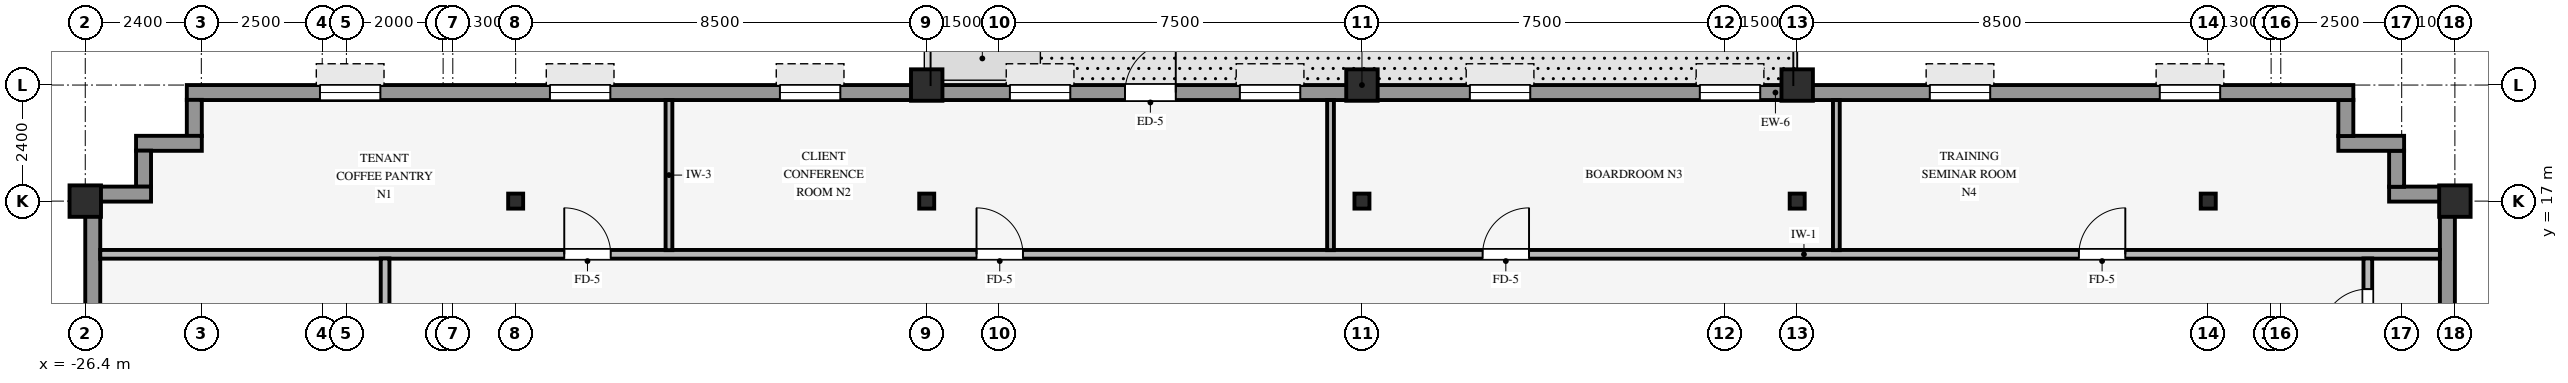
"""IFC4 building model, lengths in metres.
Left out: names, types, materials, properties, quantities, classifications, styles, units other than length and angle.
Written with IfcOpenShell. Run it as: python <this file> out.ifc"""

import sys

from ifc_helpers import new_model, si_unit, direction, frame, frame_2d, origin, origin_2d, place, context, subcontext, project, spatial, rectangle, hollow_rectangle, i_section, extrude, source, transform, mapped, element, fill, save


model = new_model("IFC4")
c1 = context("Model", 3, precision=1e-05, world=origin(), true_north=direction((0.0, 1.0)))
c2 = subcontext(c1, "Body", "Model", "MODEL_VIEW")
j1 = project(units=[si_unit("LENGTHUNIT", "METRE"), si_unit("PLANEANGLEUNIT", "RADIAN")], contexts=[c1])
p1 = place(None, origin())
s1 = spatial("IfcSite", under=j1, at=p1, CompositionType="ELEMENT")
p2 = place(p1, origin())
s2 = spatial("IfcBuilding", under=s1, at=p2, CompositionType="ELEMENT")
p3 = place(p2, frame((0.0, 0.0, 167.65)))
s3 = spatial("IfcBuildingStorey", under=s2, at=p3, CompositionType="ELEMENT", Elevation=167.65)
p4 = place(p3, frame((-26.4, 17.0, 0.0), z_axis=(0.0, 0.0, 1.0), x_axis=(1.0, 0.0, 0.0)))
e1 = element("IfcColumn", 1, at=p4, inside=s3, PredefinedType="COLUMN", context=c2, shape_type="SweptSolid", body=[
    extrude(hollow_rectangle(XDim=0.65, YDim=0.65, WallThickness=0.04, InnerFilletRadius=0.04, OuterFilletRadius=0.08, at=origin_2d()), origin(), (0.0, 0.0, 1.0), 3.37),
])
for number, where, z_axis, x_axis in (
    (2, (22.6, 17.0, -0.4), (0.0, 0.0, 1.0), (1.0, 0.0, 0.0)),
    (3, (-9.0, 19.4, -0.4), (0.0, 0.0, 1.0), (1.0, 0.0, 0.0)),
    (4, (0.0, 19.4, -0.4), (0.0, 0.0, 1.0), (1.0, 0.0, 0.0)),
    (5, (9.0, 19.4, -0.4), (0.0, 0.0, 1.0), (1.0, 0.0, 0.0)),
):
    element("IfcColumn", number, at=place(p3, frame(where, z_axis=z_axis, x_axis=x_axis)), inside=s3, PredefinedType="COLUMN", context=c2, shape_type="SweptSolid", body=[
        extrude(hollow_rectangle(XDim=0.65, YDim=0.65, WallThickness=0.04, InnerFilletRadius=0.04, OuterFilletRadius=0.08, at=origin_2d()), origin(), (0.0, 0.0, 1.0), 3.77),
    ])
for number, where, z_axis, x_axis in (
    (6, (0.0, 17.0, 0.0), (0.0, 0.0, 1.0), (1.0, 0.0, 0.0)),
    (7, (-17.5, 17.0, 0.0), (0.0, 0.0, 1.0), (1.0, 0.0, 0.0)),
    (8, (-9.0, 17.0, 0.0), (0.0, 0.0, 1.0), (1.0, 0.0, 0.0)),
    (9, (9.0, 17.0, 0.0), (0.0, 0.0, 1.0), (1.0, 0.0, 0.0)),
    (10, (17.5, 17.0, 0.0), (0.0, 0.0, 1.0), (1.0, 0.0, 0.0)),
):
    element("IfcColumn", number, at=place(p3, frame(where, z_axis=z_axis, x_axis=x_axis)), inside=s3, PredefinedType="COLUMN", context=c2, shape_type="SweptSolid", body=[
        extrude(i_section(OverallWidth=0.31, OverallDepth=0.31, WebThickness=0.015, FlangeThickness=0.015, FilletRadius=0.015, at=origin_2d()), origin(), (0.0, 0.0, 1.0), 3.37),
    ])
p5 = place(p3, frame((22.445, -20.794, 0.0), z_axis=(0.0, 0.0, 1.0), x_axis=(0.0, 1.0, 0.0)))
e11 = element("IfcWall", 11, at=p5, inside=s3, PredefinedType="STANDARD", context=c2, shape_type="SweptSolid", body=[
    extrude(rectangle(XDim=37.788, YDim=0.31, at=frame_2d((18.894, 0.0))), origin(), (0.0, 0.0, 1.0), 2.705),
])
p6 = place(p5, frame((16.444, 0.0, 0.0), z_axis=(0.0, 0.0, 1.0), x_axis=(-1.0, 0.0, 0.0)))
e12 = element("IfcOpeningElement", 12, at=p6, cuts=e11, PredefinedType="OPENING", context=c2, shape_type="SweptSolid", body=[
    extrude(rectangle(XDim=1.05, YDim=2.1, at=frame_2d((0.525, 1.05))), frame((0.0, 0.165, 0.0), z_axis=(0.0, -1.0, 0.0), x_axis=(1.0, 0.0, 0.0)), (0.0, 0.0, 1.0), 0.33),
])
p7 = place(p5, frame((7.644, 0.0, 0.8)))
e13 = element("IfcOpeningElement", 13, at=p7, cuts=e11, PredefinedType="OPENING", context=c2, shape_type="SweptSolid", body=[
    extrude(rectangle(XDim=2.05, YDim=1.52, at=frame_2d((1.025, 0.76))), frame((0.0, 0.165, 0.0), z_axis=(0.0, -1.0, 0.0), x_axis=(1.0, 0.0, 0.0)), (0.0, 0.0, 1.0), 0.33),
])
p8 = place(p5, frame((12.756, 0.0, 0.8)))
e14 = element("IfcOpeningElement", 14, at=p8, cuts=e11, PredefinedType="OPENING", context=c2, shape_type="SweptSolid", body=[
    extrude(rectangle(XDim=2.05, YDim=1.52, at=frame_2d((1.025, 0.76))), frame((0.0, 0.165, 0.0), z_axis=(0.0, -1.0, 0.0), x_axis=(1.0, 0.0, 0.0)), (0.0, 0.0, 1.0), 0.33),
])
p9 = place(p5, frame((17.869, 0.0, 0.8)))
e15 = element("IfcOpeningElement", 15, at=p9, cuts=e11, PredefinedType="OPENING", context=c2, shape_type="SweptSolid", body=[
    extrude(rectangle(XDim=2.05, YDim=1.52, at=frame_2d((1.025, 0.76))), frame((0.0, 0.165, 0.0), z_axis=(0.0, -1.0, 0.0), x_axis=(1.0, 0.0, 0.0)), (0.0, 0.0, 1.0), 0.33),
])
p10 = place(p5, frame((22.982, 0.0, 0.8)))
e16 = element("IfcOpeningElement", 16, at=p10, cuts=e11, PredefinedType="OPENING", context=c2, shape_type="SweptSolid", body=[
    extrude(rectangle(XDim=2.05, YDim=1.52, at=frame_2d((1.025, 0.76))), frame((0.0, 0.165, 0.0), z_axis=(0.0, -1.0, 0.0), x_axis=(1.0, 0.0, 0.0)), (0.0, 0.0, 1.0), 0.33),
])
p11 = place(p5, frame((27.194, 0.0, 0.8)))
e17 = element("IfcOpeningElement", 17, at=p11, cuts=e11, PredefinedType="OPENING", context=c2, shape_type="SweptSolid", body=[
    extrude(rectangle(XDim=2.05, YDim=1.52, at=frame_2d((1.025, 0.76))), frame((0.0, 0.165, 0.0), z_axis=(0.0, -1.0, 0.0), x_axis=(1.0, 0.0, 0.0)), (0.0, 0.0, 1.0), 0.33),
])
p12 = place(p5, frame((33.207, 0.0, 0.8)))
e18 = element("IfcOpeningElement", 18, at=p12, cuts=e11, PredefinedType="OPENING", context=c2, shape_type="SweptSolid", body=[
    extrude(rectangle(XDim=2.05, YDim=1.52, at=frame_2d((1.025, 0.76))), frame((0.0, 0.165, 0.0), z_axis=(0.0, -1.0, 0.0), x_axis=(1.0, 0.0, 0.0)), (0.0, 0.0, 1.0), 0.33),
])
p13 = place(p3, frame((21.24, 17.145, 0.0), z_axis=(0.0, 0.0, 1.0), x_axis=(1.0, 0.0, 0.0)))
e19 = element("IfcWall", 19, at=p13, inside=s3, PredefinedType="STANDARD", context=c2, shape_type="SweptSolid", body=[
    extrude(rectangle(XDim=1.36, YDim=0.31, at=frame_2d((0.68, 0.0))), origin(), (0.0, 0.0, 1.0), 2.816),
])
p14 = place(p3, frame((21.395, 17.296, 0.0), z_axis=(0.0, 0.0, 1.0), x_axis=(0.0, 1.0, 0.0)))
e20 = element("IfcWall", 20, at=p14, inside=s3, PredefinedType="STANDARD", context=c2, shape_type="SweptSolid", body=[
    extrude(rectangle(XDim=0.748, YDim=0.31, at=frame_2d((0.374, 0.0))), origin(), (0.0, 0.0, 1.0), 2.816),
])
p15 = place(p3, frame((20.19, 18.195, 0.0), z_axis=(0.0, 0.0, 1.0), x_axis=(1.0, 0.0, 0.0)))
e21 = element("IfcWall", 21, at=p15, inside=s3, PredefinedType="STANDARD", context=c2, shape_type="SweptSolid", body=[
    extrude(rectangle(XDim=1.36, YDim=0.31, at=frame_2d((0.68, 0.0))), origin(), (0.0, 0.0, 1.0), 2.816),
])
p16 = place(p3, frame((20.345, 18.346, 0.0), z_axis=(0.0, 0.0, 1.0), x_axis=(0.0, 1.0, 0.0)))
e22 = element("IfcWall", 22, at=p16, inside=s3, PredefinedType="STANDARD", context=c2, shape_type="SweptSolid", body=[
    extrude(rectangle(XDim=0.748, YDim=0.31, at=frame_2d((0.374, 0.0))), origin(), (0.0, 0.0, 1.0), 2.816),
])
p17 = place(p3, frame((-24.3, 19.245, 0.0), z_axis=(0.0, 0.0, 1.0), x_axis=(1.0, 0.0, 0.0)))
e23 = element("IfcWall", 23, at=p17, inside=s3, PredefinedType="STANDARD", context=c2, shape_type="SweptSolid", body=[
    extrude(rectangle(XDim=44.8, YDim=0.31, at=frame_2d((22.4, 0.0))), origin(), (0.0, 0.0, 1.0), 2.705),
])
p18 = place(p17, frame((19.4, 0.0, 0.0)))
e24 = element("IfcOpeningElement", 24, at=p18, cuts=e23, PredefinedType="OPENING", context=c2, shape_type="SweptSolid", body=[
    extrude(rectangle(XDim=1.05, YDim=2.1, at=frame_2d((0.525, 1.05))), frame((0.0, 0.165, 0.0), z_axis=(0.0, -1.0, 0.0), x_axis=(1.0, 0.0, 0.0)), (0.0, 0.0, 1.0), 0.33),
])
p19 = place(p17, frame((2.753, 0.0, 0.8)))
e25 = element("IfcOpeningElement", 25, at=p19, cuts=e23, PredefinedType="OPENING", context=c2, shape_type="SweptSolid", body=[
    extrude(rectangle(XDim=1.25, YDim=1.52, at=frame_2d((0.625, 0.76))), frame((0.0, 0.165, 0.0), z_axis=(0.0, -1.0, 0.0), x_axis=(1.0, 0.0, 0.0)), (0.0, 0.0, 1.0), 0.33),
])
p20 = place(p17, frame((7.508, 0.0, 0.8)))
e26 = element("IfcOpeningElement", 26, at=p20, cuts=e23, PredefinedType="OPENING", context=c2, shape_type="SweptSolid", body=[
    extrude(rectangle(XDim=1.25, YDim=1.52, at=frame_2d((0.625, 0.76))), frame((0.0, 0.165, 0.0), z_axis=(0.0, -1.0, 0.0), x_axis=(1.0, 0.0, 0.0)), (0.0, 0.0, 1.0), 0.33),
])
p21 = place(p17, frame((12.264, 0.0, 0.8)))
e27 = element("IfcOpeningElement", 27, at=p21, cuts=e23, PredefinedType="OPENING", context=c2, shape_type="SweptSolid", body=[
    extrude(rectangle(XDim=1.25, YDim=1.52, at=frame_2d((0.625, 0.76))), frame((0.0, 0.165, 0.0), z_axis=(0.0, -1.0, 0.0), x_axis=(1.0, 0.0, 0.0)), (0.0, 0.0, 1.0), 0.33),
])
p22 = place(p17, frame((17.019, 0.0, 0.8)))
e28 = element("IfcOpeningElement", 28, at=p22, cuts=e23, PredefinedType="OPENING", context=c2, shape_type="SweptSolid", body=[
    extrude(rectangle(XDim=1.25, YDim=1.52, at=frame_2d((0.625, 0.76))), frame((0.0, 0.165, 0.0), z_axis=(0.0, -1.0, 0.0), x_axis=(1.0, 0.0, 0.0)), (0.0, 0.0, 1.0), 0.33),
])
p23 = place(p17, frame((21.775, 0.0, 0.8)))
e29 = element("IfcOpeningElement", 29, at=p23, cuts=e23, PredefinedType="OPENING", context=c2, shape_type="SweptSolid", body=[
    extrude(rectangle(XDim=1.25, YDim=1.52, at=frame_2d((0.625, 0.76))), frame((0.0, 0.165, 0.0), z_axis=(0.0, -1.0, 0.0), x_axis=(1.0, 0.0, 0.0)), (0.0, 0.0, 1.0), 0.33),
])
p24 = place(p17, frame((26.531, 0.0, 0.8)))
e30 = element("IfcOpeningElement", 30, at=p24, cuts=e23, PredefinedType="OPENING", context=c2, shape_type="SweptSolid", body=[
    extrude(rectangle(XDim=1.25, YDim=1.52, at=frame_2d((0.625, 0.76))), frame((0.0, 0.165, 0.0), z_axis=(0.0, -1.0, 0.0), x_axis=(1.0, 0.0, 0.0)), (0.0, 0.0, 1.0), 0.33),
])
p25 = place(p17, frame((31.286, 0.0, 0.8)))
e31 = element("IfcOpeningElement", 31, at=p25, cuts=e23, PredefinedType="OPENING", context=c2, shape_type="SweptSolid", body=[
    extrude(rectangle(XDim=1.25, YDim=1.52, at=frame_2d((0.625, 0.76))), frame((0.0, 0.165, 0.0), z_axis=(0.0, -1.0, 0.0), x_axis=(1.0, 0.0, 0.0)), (0.0, 0.0, 1.0), 0.33),
])
p26 = place(p17, frame((36.042, 0.0, 0.8)))
e32 = element("IfcOpeningElement", 32, at=p26, cuts=e23, PredefinedType="OPENING", context=c2, shape_type="SweptSolid", body=[
    extrude(rectangle(XDim=1.25, YDim=1.52, at=frame_2d((0.625, 0.76))), frame((0.0, 0.165, 0.0), z_axis=(0.0, -1.0, 0.0), x_axis=(1.0, 0.0, 0.0)), (0.0, 0.0, 1.0), 0.33),
])
p27 = place(p17, frame((40.797, 0.0, 0.8)))
e33 = element("IfcOpeningElement", 33, at=p27, cuts=e23, PredefinedType="OPENING", context=c2, shape_type="SweptSolid", body=[
    extrude(rectangle(XDim=1.25, YDim=1.52, at=frame_2d((0.625, 0.76))), frame((0.0, 0.165, 0.0), z_axis=(0.0, -1.0, 0.0), x_axis=(1.0, 0.0, 0.0)), (0.0, 0.0, 1.0), 0.33),
])
p28 = place(p3, frame((-24.145, 18.346, 0.0), z_axis=(0.0, 0.0, 1.0), x_axis=(0.0, 1.0, 0.0)))
e34 = element("IfcWall", 34, at=p28, inside=s3, PredefinedType="STANDARD", context=c2, shape_type="SweptSolid", body=[
    extrude(rectangle(XDim=0.748, YDim=0.31, at=frame_2d((0.374, 0.0))), origin(), (0.0, 0.0, 1.0), 2.816),
])
p29 = place(p3, frame((-25.35, 18.195, 0.0), z_axis=(0.0, 0.0, 1.0), x_axis=(1.0, 0.0, 0.0)))
e35 = element("IfcWall", 35, at=p29, inside=s3, PredefinedType="STANDARD", context=c2, shape_type="SweptSolid", body=[
    extrude(rectangle(XDim=1.36, YDim=0.31, at=frame_2d((0.68, 0.0))), origin(), (0.0, 0.0, 1.0), 2.816),
])
p30 = place(p3, frame((-25.195, 17.296, 0.0), z_axis=(0.0, 0.0, 1.0), x_axis=(0.0, 1.0, 0.0)))
e36 = element("IfcWall", 36, at=p30, inside=s3, PredefinedType="STANDARD", context=c2, shape_type="SweptSolid", body=[
    extrude(rectangle(XDim=0.748, YDim=0.31, at=frame_2d((0.374, 0.0))), origin(), (0.0, 0.0, 1.0), 2.816),
])
p31 = place(p3, frame((-26.4, 17.145, 0.0), z_axis=(0.0, 0.0, 1.0), x_axis=(1.0, 0.0, 0.0)))
e37 = element("IfcWall", 37, at=p31, inside=s3, PredefinedType="STANDARD", context=c2, shape_type="SweptSolid", body=[
    extrude(rectangle(XDim=1.36, YDim=0.31, at=frame_2d((0.68, 0.0))), origin(), (0.0, 0.0, 1.0), 2.816),
])
p32 = place(p3, frame((-26.245, 1.7, 0.0), z_axis=(0.0, 0.0, 1.0), x_axis=(0.0, 1.0, 0.0)))
e38 = element("IfcWall", 38, at=p32, inside=s3, PredefinedType="STANDARD", context=c2, shape_type="SweptSolid", body=[
    extrude(rectangle(XDim=15.294, YDim=0.31, at=frame_2d((7.647, 0.0))), origin(), (0.0, 0.0, 1.0), 2.705),
])
p33 = place(p32, frame((3.299, 0.0, 0.8)))
e39 = element("IfcOpeningElement", 39, at=p33, cuts=e38, PredefinedType="OPENING", context=c2, shape_type="SweptSolid", body=[
    extrude(rectangle(XDim=2.05, YDim=1.52, at=frame_2d((1.025, 0.76))), frame((0.0, 0.165, 0.0), z_axis=(0.0, -1.0, 0.0), x_axis=(1.0, 0.0, 0.0)), (0.0, 0.0, 1.0), 0.33),
])
p34 = place(p32, frame((9.946, 0.0, 0.8)))
e40 = element("IfcOpeningElement", 40, at=p34, cuts=e38, PredefinedType="OPENING", context=c2, shape_type="SweptSolid", body=[
    extrude(rectangle(XDim=2.05, YDim=1.52, at=frame_2d((1.025, 0.76))), frame((0.0, 0.165, 0.0), z_axis=(0.0, -1.0, 0.0), x_axis=(1.0, 0.0, 0.0)), (0.0, 0.0, 1.0), 0.33),
])
p35 = place(p3, frame((-26.09, 15.9, 0.0), z_axis=(0.0, 0.0, 1.0), x_axis=(1.0, 0.0, 0.0)))
e41 = element("IfcWall", 41, at=p35, inside=s3, PredefinedType="PARTITIONING", context=c2, shape_type="SweptSolid", body=[
    extrude(rectangle(XDim=48.38, YDim=0.18, at=frame_2d((24.19, 0.0))), origin(), (0.0, 0.0, 1.0), 3.36),
])
p36 = place(p35, frame((18.12, 0.0, 0.0)))
e42 = element("IfcOpeningElement", 42, at=p36, cuts=e41, PredefinedType="OPENING", context=c2, shape_type="SweptSolid", body=[
    extrude(rectangle(XDim=0.96, YDim=2.1, at=frame_2d((0.48, 1.05))), frame((0.0, 0.1, 0.0), z_axis=(0.0, -1.0, 0.0), x_axis=(1.0, 0.0, 0.0)), (0.0, 0.0, 1.0), 0.2),
])
p37 = place(p35, frame((40.915, 0.0, 0.0)))
e43 = element("IfcOpeningElement", 43, at=p37, cuts=e41, PredefinedType="OPENING", context=c2, shape_type="SweptSolid", body=[
    extrude(rectangle(XDim=0.96, YDim=2.1, at=frame_2d((0.48, 1.05))), frame((0.0, 0.1, 0.0), z_axis=(0.0, -1.0, 0.0), x_axis=(1.0, 0.0, 0.0)), (0.0, 0.0, 1.0), 0.2),
])
p38 = place(p35, frame((28.585, 0.0, 0.0)))
e44 = element("IfcOpeningElement", 44, at=p38, cuts=e41, PredefinedType="OPENING", context=c2, shape_type="SweptSolid", body=[
    extrude(rectangle(XDim=0.96, YDim=2.1, at=frame_2d((0.48, 1.05))), frame((0.0, 0.1, 0.0), z_axis=(0.0, -1.0, 0.0), x_axis=(1.0, 0.0, 0.0)), (0.0, 0.0, 1.0), 0.2),
])
p39 = place(p35, frame((9.595, 0.0, 0.0)))
e45 = element("IfcOpeningElement", 45, at=p39, cuts=e41, PredefinedType="OPENING", context=c2, shape_type="SweptSolid", body=[
    extrude(rectangle(XDim=0.96, YDim=2.1, at=frame_2d((0.48, 1.05))), frame((0.0, 0.1, 0.0), z_axis=(0.0, -1.0, 0.0), x_axis=(1.0, 0.0, 0.0)), (0.0, 0.0, 1.0), 0.2),
])
p40 = place(p3, frame((-20.2, -15.814, 0.0), z_axis=(0.0, 0.0, 1.0), x_axis=(0.0, 1.0, 0.0)))
e46 = element("IfcWall", 46, at=p40, inside=s3, PredefinedType="PARTITIONING", context=c2, shape_type="SweptSolid", body=[
    extrude(rectangle(XDim=31.628, YDim=0.18, at=frame_2d((15.814, 0.0))), origin(), (0.0, 0.0, 1.0), 3.36),
])
p41 = place(p40, frame((15.334, 0.0, 0.0)))
e47 = element("IfcOpeningElement", 47, at=p41, cuts=e46, PredefinedType="OPENING", context=c2, shape_type="SweptSolid", body=[
    extrude(rectangle(XDim=0.96, YDim=2.1, at=frame_2d((0.48, 1.05))), frame((0.0, 0.1, 0.0), z_axis=(0.0, -1.0, 0.0), x_axis=(1.0, 0.0, 0.0)), (0.0, 0.0, 1.0), 0.2),
])
for number, where, z_axis, x_axis in (
    (48, (-14.33, 15.986, 0.0), (0.0, 0.0, 1.0), (0.0, 1.0, 0.0)),
    (49, (-0.65, 15.986, 0.0), (0.0, 0.0, 1.0), (0.0, 1.0, 0.0)),
    (50, (9.81, 15.986, 0.0), (0.0, 0.0, 1.0), (0.0, 1.0, 0.0)),
):
    element("IfcWall", number, at=place(p3, frame(where, z_axis=z_axis, x_axis=x_axis)), inside=s3, PredefinedType="PARTITIONING", context=c2, shape_type="SweptSolid", body=[
        extrude(rectangle(XDim=3.104, YDim=0.14, at=frame_2d((1.552, 0.0))), origin(), (0.0, 0.0, 1.0), 3.36),
    ])
p42 = place(p3, frame((20.8, 13.586, 0.0), z_axis=(0.0, 0.0, 1.0), x_axis=(0.0, 1.0, 0.0)))
e51 = element("IfcWall", 51, at=p42, inside=s3, PredefinedType="PARTITIONING", context=c2, shape_type="SweptSolid", body=[
    extrude(rectangle(XDim=2.228, YDim=0.18, at=frame_2d((1.114, 0.0))), origin(), (0.0, 0.0, 1.0), 3.36),
])
p43 = place(p42, frame((0.634, 0.0, 0.0)))
e52 = element("IfcOpeningElement", 52, at=p43, cuts=e51, PredefinedType="OPENING", context=c2, shape_type="SweptSolid", body=[
    extrude(rectangle(XDim=0.96, YDim=2.1, at=frame_2d((0.48, 1.05))), frame((0.0, 0.1, 0.0), z_axis=(0.0, -1.0, 0.0), x_axis=(1.0, 0.0, 0.0)), (0.0, 0.0, 1.0), 0.2),
])
m1 = source(origin(), c2, "Body", "SweptSolid", [
    extrude(rectangle(XDim=1.05, YDim=2.1, at=frame_2d((0.525, 1.05))), frame((0.0, 0.025, 0.0), z_axis=(0.0, -1.0, 0.0), x_axis=(1.0, 0.0, 0.0)), (0.0, 0.0, 1.0), 0.05),
])
p44 = place(p18, origin())
e53 = element("IfcDoor", 53, at=p44, inside=s3, OperationType="SINGLE_SWING_RIGHT", PredefinedType="DOOR", context=c2, shape_type="MappedRepresentation", body=[
    mapped(m1, transform((0.0, 0.0, 0.0), scale=1.0)),
])
fill(e24, e53)
m2 = source(origin(), c2, "Body", "SweptSolid", [
    extrude(rectangle(XDim=1.25, YDim=1.52, at=frame_2d((0.625, 0.76))), frame((0.0, 0.03, 0.0), z_axis=(0.0, -1.0, 0.0), x_axis=(1.0, 0.0, 0.0)), (0.0, 0.0, 1.0), 0.06),
])
p45 = place(p19, origin())
e54 = element("IfcWindow", 54, at=p45, inside=s3, PartitioningType="SINGLE_PANEL", PredefinedType="WINDOW", context=c2, shape_type="MappedRepresentation", body=[
    mapped(m2, transform((0.0, 0.0, 0.0), scale=1.0)),
])
fill(e25, e54)
p46 = place(p20, origin())
e55 = element("IfcWindow", 55, at=p46, inside=s3, PartitioningType="SINGLE_PANEL", PredefinedType="WINDOW", context=c2, shape_type="MappedRepresentation", body=[
    mapped(m2, transform((0.0, 0.0, 0.0), scale=1.0)),
])
fill(e26, e55)
p47 = place(p21, origin())
e56 = element("IfcWindow", 56, at=p47, inside=s3, PartitioningType="SINGLE_PANEL", PredefinedType="WINDOW", context=c2, shape_type="MappedRepresentation", body=[
    mapped(m2, transform((0.0, 0.0, 0.0), scale=1.0)),
])
fill(e27, e56)
p48 = place(p22, origin())
e57 = element("IfcWindow", 57, at=p48, inside=s3, PartitioningType="SINGLE_PANEL", PredefinedType="WINDOW", context=c2, shape_type="MappedRepresentation", body=[
    mapped(m2, transform((0.0, 0.0, 0.0), scale=1.0)),
])
fill(e28, e57)
p49 = place(p23, origin())
e58 = element("IfcWindow", 58, at=p49, inside=s3, PartitioningType="SINGLE_PANEL", PredefinedType="WINDOW", context=c2, shape_type="MappedRepresentation", body=[
    mapped(m2, transform((0.0, 0.0, 0.0), scale=1.0)),
])
fill(e29, e58)
p50 = place(p24, origin())
e59 = element("IfcWindow", 59, at=p50, inside=s3, PartitioningType="SINGLE_PANEL", PredefinedType="WINDOW", context=c2, shape_type="MappedRepresentation", body=[
    mapped(m2, transform((0.0, 0.0, 0.0), scale=1.0)),
])
fill(e30, e59)
p51 = place(p25, origin())
e60 = element("IfcWindow", 60, at=p51, inside=s3, PartitioningType="SINGLE_PANEL", PredefinedType="WINDOW", context=c2, shape_type="MappedRepresentation", body=[
    mapped(m2, transform((0.0, 0.0, 0.0), scale=1.0)),
])
fill(e31, e60)
p52 = place(p26, origin())
e61 = element("IfcWindow", 61, at=p52, inside=s3, PartitioningType="SINGLE_PANEL", PredefinedType="WINDOW", context=c2, shape_type="MappedRepresentation", body=[
    mapped(m2, transform((0.0, 0.0, 0.0), scale=1.0)),
])
fill(e32, e61)
p53 = place(p27, origin())
e62 = element("IfcWindow", 62, at=p53, inside=s3, PartitioningType="SINGLE_PANEL", PredefinedType="WINDOW", context=c2, shape_type="MappedRepresentation", body=[
    mapped(m2, transform((0.0, 0.0, 0.0), scale=1.0)),
])
fill(e33, e62)
m3 = source(origin(), c2, "Body", "SweptSolid", [
    extrude(rectangle(XDim=0.96, YDim=2.1, at=frame_2d((0.48, 1.05))), frame((0.0, 0.025, 0.0), z_axis=(0.0, -1.0, 0.0), x_axis=(1.0, 0.0, 0.0)), (0.0, 0.0, 1.0), 0.05),
])
p54 = place(p36, origin())
e63 = element("IfcDoor", 63, at=p54, inside=s3, OperationType="SINGLE_SWING_LEFT", PredefinedType="DOOR", context=c2, shape_type="MappedRepresentation", body=[
    mapped(m3, transform((0.0, 0.0, 0.0), scale=1.0)),
])
fill(e42, e63)
p55 = place(p37, origin())
e64 = element("IfcDoor", 64, at=p55, inside=s3, OperationType="SINGLE_SWING_RIGHT", PredefinedType="DOOR", context=c2, shape_type="MappedRepresentation", body=[
    mapped(m3, transform((0.0, 0.0, 0.0), scale=1.0)),
])
fill(e43, e64)
p56 = place(p38, origin())
e65 = element("IfcDoor", 65, at=p56, inside=s3, OperationType="SINGLE_SWING_RIGHT", PredefinedType="DOOR", context=c2, shape_type="MappedRepresentation", body=[
    mapped(m3, transform((0.0, 0.0, 0.0), scale=1.0)),
])
fill(e44, e65)
p57 = place(p39, origin())
e66 = element("IfcDoor", 66, at=p57, inside=s3, OperationType="SINGLE_SWING_LEFT", PredefinedType="DOOR", context=c2, shape_type="MappedRepresentation", body=[
    mapped(m3, transform((0.0, 0.0, 0.0), scale=1.0)),
])
fill(e45, e66)
p58 = place(p43, origin())
e67 = element("IfcDoor", 67, at=p58, inside=s3, OperationType="SINGLE_SWING_LEFT", PredefinedType="DOOR", context=c2, shape_type="MappedRepresentation", body=[
    mapped(m3, transform((0.0, 0.0, 0.0), scale=1.0)),
])
fill(e52, e67)
save(model, sys.argv[1])
